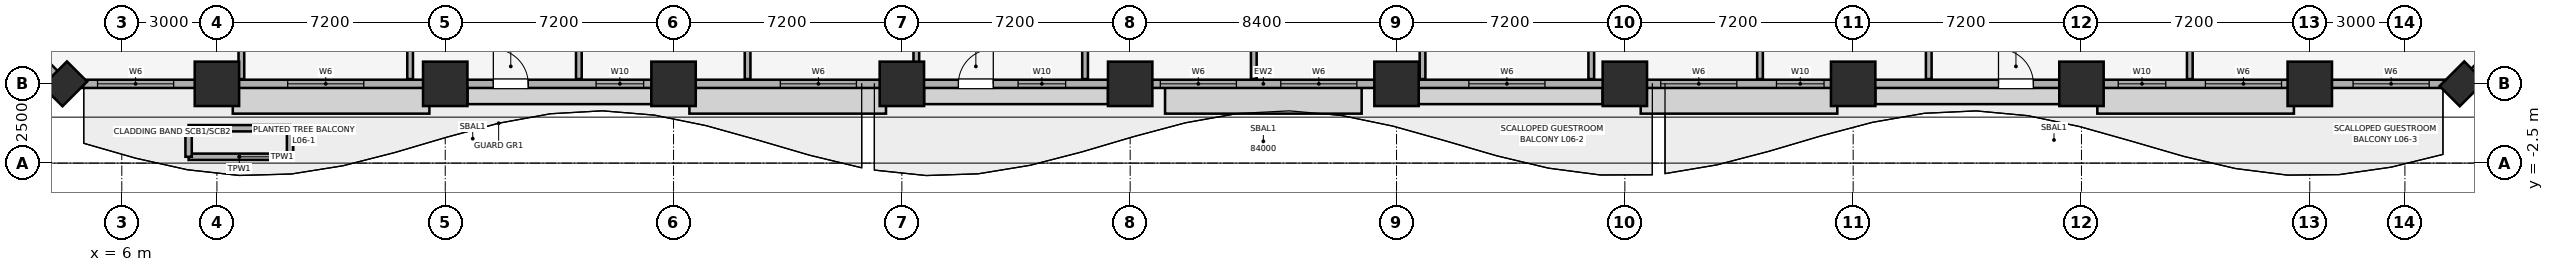
"""IFC4 building model, lengths in metres.
Left out: names, types, materials, properties, quantities, classifications, styles, units other than length and angle.
Written with IfcOpenShell. Run it as: python <this file> out.ifc"""

import sys

from ifc_helpers import new_model, si_unit, direction, frame, frame_2d, origin, origin_2d, place, context, subcontext, project, spatial, rectangle, extrude, element, fill, save


model = new_model("IFC4")
c1 = context("Model", 3, precision=1e-05, world=origin(), true_north=direction((0.0, 1.0)))
c2 = subcontext(c1, "Body", "Model", "MODEL_VIEW")
j1 = project(units=[si_unit("LENGTHUNIT", "METRE"), si_unit("PLANEANGLEUNIT", "RADIAN")], contexts=[c1])
p1 = place(None, origin())
s1 = spatial("IfcSite", under=j1, at=p1, CompositionType="ELEMENT")
p2 = place(p1, origin())
s2 = spatial("IfcBuilding", under=s1, at=p2, CompositionType="ELEMENT")
p3 = place(p2, frame((0.0, 0.0, 35.15)))
s3 = spatial("IfcBuildingStorey", under=s2, at=p3, CompositionType="ELEMENT", Elevation=35.15)
for number, where, z_axis, x_axis in (
    (1, (9.0, 0.0, 0.0), (0.0, 0.0, 1.0), (1.0, 0.0, 0.0)),
    (2, (16.2, 0.0, 0.0), (0.0, 0.0, 1.0), (1.0, 0.0, 0.0)),
    (3, (23.4, 0.0, 0.0), (0.0, 0.0, 1.0), (1.0, 0.0, 0.0)),
    (4, (30.6, 0.0, 0.0), (0.0, 0.0, 1.0), (1.0, 0.0, 0.0)),
    (5, (37.8, 0.0, 0.0), (0.0, 0.0, 1.0), (1.0, 0.0, 0.0)),
    (6, (46.2, 0.0, 0.0), (0.0, 0.0, 1.0), (1.0, 0.0, 0.0)),
    (7, (53.4, 0.0, 0.0), (0.0, 0.0, 1.0), (1.0, 0.0, 0.0)),
    (8, (60.6, 0.0, 0.0), (0.0, 0.0, 1.0), (1.0, 0.0, 0.0)),
    (9, (67.8, 0.0, 0.0), (0.0, 0.0, 1.0), (1.0, 0.0, 0.0)),
    (10, (75.0, 0.0, 0.0), (0.0, 0.0, 1.0), (1.0, 0.0, 0.0)),
):
    element("IfcColumn", number, at=place(p3, frame(where, z_axis=z_axis, x_axis=x_axis)), inside=s3, PredefinedType="COLUMN", context=c2, shape_type="SweptSolid", body=[
        extrude(rectangle(XDim=1.4, YDim=1.4, at=origin_2d()), origin(), (0.0, 0.0, 1.0), 3.51),
    ])
for number, where, z_axis, x_axis in (
    (11, (4.2, 0.0, 0.0), (0.0, 0.0, 1.0), (0.707, 0.707, 0.0)),
    (12, (79.8, 0.0, 0.0), (0.0, 0.0, 1.0), (0.707, 0.707, 0.0)),
):
    element("IfcColumn", number, at=place(p3, frame(where, z_axis=z_axis, x_axis=x_axis)), inside=s3, PredefinedType="PILASTER", context=c2, shape_type="SweptSolid", body=[
        extrude(rectangle(XDim=1.1, YDim=0.9, at=origin_2d()), origin(), (0.0, 0.0, 1.0), 3.51),
    ])
p4 = place(p3, frame((4.2, 0.0, 0.0), z_axis=(0.0, 0.0, 1.0), x_axis=(1.0, 0.0, 0.0)))
e13 = element("IfcWall", 13, at=p4, inside=s3, PredefinedType="SOLIDWALL", context=c2, shape_type="SweptSolid", body=[
    extrude(rectangle(XDim=75.6, YDim=0.26, at=frame_2d((37.8, 0.0))), origin(), (0.0, 0.0, 1.0), 2.56),
])
p5 = place(p4, frame((13.517, 0.0, 0.0)))
e14 = element("IfcOpeningElement", 14, at=p5, cuts=e13, PredefinedType="OPENING", context=c2, shape_type="SweptSolid", body=[
    extrude(rectangle(XDim=1.1, YDim=2.15, at=frame_2d((0.55, 1.075))), frame((0.0, 0.14, 0.0), z_axis=(0.0, -1.0, 0.0), x_axis=(1.0, 0.0, 0.0)), (0.0, 0.0, 1.0), 0.28),
])
p6 = place(p4, frame((28.183, 0.0, 0.0)))
e15 = element("IfcOpeningElement", 15, at=p6, cuts=e13, PredefinedType="OPENING", context=c2, shape_type="SweptSolid", body=[
    extrude(rectangle(XDim=1.1, YDim=2.15, at=frame_2d((0.55, 1.075))), frame((0.0, 0.14, 0.0), z_axis=(0.0, -1.0, 0.0), x_axis=(1.0, 0.0, 0.0)), (0.0, 0.0, 1.0), 0.28),
])
p7 = place(p4, frame((60.983, 0.0, 0.0)))
e16 = element("IfcOpeningElement", 16, at=p7, cuts=e13, PredefinedType="OPENING", context=c2, shape_type="SweptSolid", body=[
    extrude(rectangle(XDim=1.1, YDim=2.15, at=frame_2d((0.55, 1.075))), frame((0.0, 0.14, 0.0), z_axis=(0.0, -1.0, 0.0), x_axis=(1.0, 0.0, 0.0)), (0.0, 0.0, 1.0), 0.28),
])
p8 = place(p4, frame((1.035, 0.0, 0.85)))
e17 = element("IfcOpeningElement", 17, at=p8, cuts=e13, PredefinedType="OPENING", context=c2, shape_type="SweptSolid", body=[
    extrude(rectangle(XDim=2.4, YDim=1.5, at=frame_2d((1.2, 0.75))), frame((0.0, 0.14, 0.0), z_axis=(0.0, -1.0, 0.0), x_axis=(1.0, 0.0, 0.0)), (0.0, 0.0, 1.0), 0.28),
])
p9 = place(p4, frame((7.031, 0.0, 0.85)))
e18 = element("IfcOpeningElement", 18, at=p9, cuts=e13, PredefinedType="OPENING", context=c2, shape_type="SweptSolid", body=[
    extrude(rectangle(XDim=2.4, YDim=1.5, at=frame_2d((1.2, 0.75))), frame((0.0, 0.14, 0.0), z_axis=(0.0, -1.0, 0.0), x_axis=(1.0, 0.0, 0.0)), (0.0, 0.0, 1.0), 0.28),
])
p10 = place(p4, frame((16.757, 0.0, 0.85)))
e19 = element("IfcOpeningElement", 19, at=p10, cuts=e13, PredefinedType="OPENING", context=c2, shape_type="SweptSolid", body=[
    extrude(rectangle(XDim=1.5, YDim=1.4, at=frame_2d((0.75, 0.7))), frame((0.0, 0.14, 0.0), z_axis=(0.0, -1.0, 0.0), x_axis=(1.0, 0.0, 0.0)), (0.0, 0.0, 1.0), 0.28),
])
p11 = place(p4, frame((22.567, 0.0, 0.85)))
e20 = element("IfcOpeningElement", 20, at=p11, cuts=e13, PredefinedType="OPENING", context=c2, shape_type="SweptSolid", body=[
    extrude(rectangle(XDim=2.4, YDim=1.5, at=frame_2d((1.2, 0.75))), frame((0.0, 0.14, 0.0), z_axis=(0.0, -1.0, 0.0), x_axis=(1.0, 0.0, 0.0)), (0.0, 0.0, 1.0), 0.28),
])
p12 = place(p4, frame((30.065, 0.0, 0.85)))
e21 = element("IfcOpeningElement", 21, at=p12, cuts=e13, PredefinedType="OPENING", context=c2, shape_type="SweptSolid", body=[
    extrude(rectangle(XDim=1.5, YDim=1.4, at=frame_2d((0.75, 0.7))), frame((0.0, 0.14, 0.0), z_axis=(0.0, -1.0, 0.0), x_axis=(1.0, 0.0, 0.0)), (0.0, 0.0, 1.0), 0.28),
])
p13 = place(p4, frame((34.55, 0.0, 0.85)))
e22 = element("IfcOpeningElement", 22, at=p13, cuts=e13, PredefinedType="OPENING", context=c2, shape_type="SweptSolid", body=[
    extrude(rectangle(XDim=2.4, YDim=1.5, at=frame_2d((1.2, 0.75))), frame((0.0, 0.14, 0.0), z_axis=(0.0, -1.0, 0.0), x_axis=(1.0, 0.0, 0.0)), (0.0, 0.0, 1.0), 0.28),
])
p14 = place(p4, frame((38.35, 0.0, 0.85)))
e23 = element("IfcOpeningElement", 23, at=p14, cuts=e13, PredefinedType="OPENING", context=c2, shape_type="SweptSolid", body=[
    extrude(rectangle(XDim=2.4, YDim=1.5, at=frame_2d((1.2, 0.75))), frame((0.0, 0.14, 0.0), z_axis=(0.0, -1.0, 0.0), x_axis=(1.0, 0.0, 0.0)), (0.0, 0.0, 1.0), 0.28),
])
p15 = place(p4, frame((44.281, 0.0, 0.85)))
e24 = element("IfcOpeningElement", 24, at=p15, cuts=e13, PredefinedType="OPENING", context=c2, shape_type="SweptSolid", body=[
    extrude(rectangle(XDim=2.4, YDim=1.5, at=frame_2d((1.2, 0.75))), frame((0.0, 0.14, 0.0), z_axis=(0.0, -1.0, 0.0), x_axis=(1.0, 0.0, 0.0)), (0.0, 0.0, 1.0), 0.28),
])
p16 = place(p4, frame((50.332, 0.0, 0.85)))
e25 = element("IfcOpeningElement", 25, at=p16, cuts=e13, PredefinedType="OPENING", context=c2, shape_type="SweptSolid", body=[
    extrude(rectangle(XDim=2.4, YDim=1.5, at=frame_2d((1.2, 0.75))), frame((0.0, 0.14, 0.0), z_axis=(0.0, -1.0, 0.0), x_axis=(1.0, 0.0, 0.0)), (0.0, 0.0, 1.0), 0.28),
])
p17 = place(p4, frame((53.981, 0.0, 0.85)))
e26 = element("IfcOpeningElement", 26, at=p17, cuts=e13, PredefinedType="OPENING", context=c2, shape_type="SweptSolid", body=[
    extrude(rectangle(XDim=1.5, YDim=1.4, at=frame_2d((0.75, 0.7))), frame((0.0, 0.14, 0.0), z_axis=(0.0, -1.0, 0.0), x_axis=(1.0, 0.0, 0.0)), (0.0, 0.0, 1.0), 0.28),
])
p18 = place(p4, frame((64.759, 0.0, 0.85)))
e27 = element("IfcOpeningElement", 27, at=p18, cuts=e13, PredefinedType="OPENING", context=c2, shape_type="SweptSolid", body=[
    extrude(rectangle(XDim=1.5, YDim=1.4, at=frame_2d((0.75, 0.7))), frame((0.0, 0.14, 0.0), z_axis=(0.0, -1.0, 0.0), x_axis=(1.0, 0.0, 0.0)), (0.0, 0.0, 1.0), 0.28),
])
p19 = place(p4, frame((67.509, 0.0, 0.85)))
e28 = element("IfcOpeningElement", 28, at=p19, cuts=e13, PredefinedType="OPENING", context=c2, shape_type="SweptSolid", body=[
    extrude(rectangle(XDim=2.4, YDim=1.5, at=frame_2d((1.2, 0.75))), frame((0.0, 0.14, 0.0), z_axis=(0.0, -1.0, 0.0), x_axis=(1.0, 0.0, 0.0)), (0.0, 0.0, 1.0), 0.28),
])
p20 = place(p4, frame((72.165, 0.0, 0.85)))
e29 = element("IfcOpeningElement", 29, at=p20, cuts=e13, PredefinedType="OPENING", context=c2, shape_type="SweptSolid", body=[
    extrude(rectangle(XDim=2.4, YDim=1.5, at=frame_2d((1.2, 0.75))), frame((0.0, 0.14, 0.0), z_axis=(0.0, -1.0, 0.0), x_axis=(1.0, 0.0, 0.0)), (0.0, 0.0, 1.0), 0.28),
])
for number, where, z_axis, x_axis in (
    (30, (79.8, 0.0, 0.0), (0.0, 0.0, 1.0), (0.707, 0.707, 0.0)),
    (31, (0.0, 4.2, 0.0), (0.0, 0.0, 1.0), (0.707, -0.707, 0.0)),
):
    element("IfcWall", number, at=place(p3, frame(where, z_axis=z_axis, x_axis=x_axis)), inside=s3, PredefinedType="SOLIDWALL", context=c2, shape_type="SweptSolid", body=[
        extrude(rectangle(XDim=5.94, YDim=0.26, at=frame_2d((2.97, 0.0))), origin(), (0.0, 0.0, 1.0), 2.56),
    ])
p21 = place(p3, frame((8.107, -2.3, 0.0), z_axis=(0.0, 0.0, 1.0), x_axis=(1.0, 0.0, 0.0)))
e32 = element("IfcWall", 32, at=p21, inside=s3, PredefinedType="PARAPET", context=c2, shape_type="SweptSolid", body=[
    extrude(rectangle(XDim=3.2, YDim=0.2, at=frame_2d((1.6, 0.0))), origin(), (0.0, 0.0, 1.0), 0.55),
])
p22 = place(p3, frame((11.307, -2.3, 0.0), z_axis=(0.0, 0.0, 1.0), x_axis=(0.0, 1.0, 0.0)))
e33 = element("IfcWall", 33, at=p22, inside=s3, PredefinedType="PARAPET", context=c2, shape_type="SweptSolid", body=[
    extrude(rectangle(XDim=0.9, YDim=0.2, at=frame_2d((0.45, 0.0))), origin(), (0.0, 0.0, 1.0), 0.55),
])
p23 = place(p3, frame((11.307, -1.4, 0.0), z_axis=(0.0, 0.0, 1.0), x_axis=(-1.0, 0.0, 0.0)))
e34 = element("IfcWall", 34, at=p23, inside=s3, PredefinedType="PARAPET", context=c2, shape_type="SweptSolid", body=[
    extrude(rectangle(XDim=3.2, YDim=0.2, at=frame_2d((1.6, 0.0))), origin(), (0.0, 0.0, 1.0), 0.55),
])
p24 = place(p3, frame((8.107, -1.4, 0.0), z_axis=(0.0, 0.0, 1.0), x_axis=(0.0, -1.0, 0.0)))
e35 = element("IfcWall", 35, at=p24, inside=s3, PredefinedType="PARAPET", context=c2, shape_type="SweptSolid", body=[
    extrude(rectangle(XDim=0.9, YDim=0.2, at=frame_2d((0.45, 0.0))), origin(), (0.0, 0.0, 1.0), 0.55),
])
for number, where, z_axis, x_axis in (
    (36, (9.771, 0.15, 0.0), (0.0, 0.0, 1.0), (0.0, 1.0, 0.0)),
    (37, (15.093, 0.15, 0.0), (0.0, 0.0, 1.0), (0.0, 1.0, 0.0)),
    (38, (20.414, 0.15, 0.0), (0.0, 0.0, 1.0), (0.0, 1.0, 0.0)),
    (39, (25.735, 0.15, 0.0), (0.0, 0.0, 1.0), (0.0, 1.0, 0.0)),
    (40, (31.056, 0.15, 0.0), (0.0, 0.0, 1.0), (0.0, 1.0, 0.0)),
    (41, (36.377, 0.15, 0.0), (0.0, 0.0, 1.0), (0.0, 1.0, 0.0)),
    (42, (41.699, 0.15, 0.0), (0.0, 0.0, 1.0), (0.0, 1.0, 0.0)),
    (43, (47.02, 0.15, 0.0), (0.0, 0.0, 1.0), (0.0, 1.0, 0.0)),
    (44, (52.341, 0.15, 0.0), (0.0, 0.0, 1.0), (0.0, 1.0, 0.0)),
    (45, (57.663, 0.15, 0.0), (0.0, 0.0, 1.0), (0.0, 1.0, 0.0)),
    (46, (62.984, 0.15, 0.0), (0.0, 0.0, 1.0), (0.0, 1.0, 0.0)),
):
    element("IfcWall", number, at=place(p3, frame(where, z_axis=z_axis, x_axis=x_axis)), inside=s3, PredefinedType="PARTITIONING", context=c2, shape_type="SweptSolid", body=[
        extrude(rectangle(XDim=8.555, YDim=0.18, at=frame_2d((4.278, 0.0))), origin(), (0.0, 0.0, 1.0), 3.51),
    ])
p25 = place(p3, frame((71.217, 0.15, 0.0), z_axis=(0.0, 0.0, 1.0), x_axis=(0.0, 1.0, 0.0)))
e47 = element("IfcWall", 47, at=p25, inside=s3, PredefinedType="PARTITIONING", context=c2, shape_type="SweptSolid", body=[
    extrude(rectangle(XDim=8.555, YDim=0.18, at=frame_2d((4.278, 0.0))), origin(), (0.0, 0.0, 1.0), 2.88),
])
p26 = place(p5, origin())
e48 = element("IfcDoor", 48, at=p26, inside=s3, OperationType="SINGLE_SWING_LEFT", PredefinedType="DOOR", context=c2, shape_type="SweptSolid", body=[
    extrude(rectangle(XDim=1.1, YDim=2.15, at=frame_2d((0.55, 1.075))), frame((0.0, 0.025, 0.0), z_axis=(0.0, -1.0, 0.0), x_axis=(1.0, 0.0, 0.0)), (0.0, 0.0, 1.0), 0.05),
])
fill(e14, e48)
p27 = place(p6, origin())
e49 = element("IfcDoor", 49, at=p27, inside=s3, OperationType="SINGLE_SWING_RIGHT", PredefinedType="DOOR", context=c2, shape_type="SweptSolid", body=[
    extrude(rectangle(XDim=1.1, YDim=2.15, at=frame_2d((0.55, 1.075))), frame((0.0, 0.025, 0.0), z_axis=(0.0, -1.0, 0.0), x_axis=(1.0, 0.0, 0.0)), (0.0, 0.0, 1.0), 0.05),
])
fill(e15, e49)
p28 = place(p7, origin())
e50 = element("IfcDoor", 50, at=p28, inside=s3, OperationType="SINGLE_SWING_LEFT", PredefinedType="DOOR", context=c2, shape_type="SweptSolid", body=[
    extrude(rectangle(XDim=1.1, YDim=2.15, at=frame_2d((0.55, 1.075))), frame((0.0, 0.025, 0.0), z_axis=(0.0, -1.0, 0.0), x_axis=(1.0, 0.0, 0.0)), (0.0, 0.0, 1.0), 0.05),
])
fill(e16, e50)
p29 = place(p8, origin())
e51 = element("IfcWindow", 51, at=p29, inside=s3, PartitioningType="SINGLE_PANEL", PredefinedType="WINDOW", context=c2, shape_type="SweptSolid", body=[
    extrude(rectangle(XDim=2.4, YDim=1.5, at=frame_2d((1.2, 0.75))), frame((0.0, 0.03, 0.0), z_axis=(0.0, -1.0, 0.0), x_axis=(1.0, 0.0, 0.0)), (0.0, 0.0, 1.0), 0.06),
])
fill(e17, e51)
p30 = place(p9, origin())
e52 = element("IfcWindow", 52, at=p30, inside=s3, PartitioningType="SINGLE_PANEL", PredefinedType="WINDOW", context=c2, shape_type="SweptSolid", body=[
    extrude(rectangle(XDim=2.4, YDim=1.5, at=frame_2d((1.2, 0.75))), frame((0.0, 0.03, 0.0), z_axis=(0.0, -1.0, 0.0), x_axis=(1.0, 0.0, 0.0)), (0.0, 0.0, 1.0), 0.06),
])
fill(e18, e52)
p31 = place(p10, origin())
e53 = element("IfcWindow", 53, at=p31, inside=s3, PartitioningType="SINGLE_PANEL", PredefinedType="WINDOW", context=c2, shape_type="SweptSolid", body=[
    extrude(rectangle(XDim=1.5, YDim=1.4, at=frame_2d((0.75, 0.7))), frame((0.0, 0.03, 0.0), z_axis=(0.0, -1.0, 0.0), x_axis=(1.0, 0.0, 0.0)), (0.0, 0.0, 1.0), 0.06),
])
fill(e19, e53)
p32 = place(p11, origin())
e54 = element("IfcWindow", 54, at=p32, inside=s3, PartitioningType="SINGLE_PANEL", PredefinedType="WINDOW", context=c2, shape_type="SweptSolid", body=[
    extrude(rectangle(XDim=2.4, YDim=1.5, at=frame_2d((1.2, 0.75))), frame((0.0, 0.03, 0.0), z_axis=(0.0, -1.0, 0.0), x_axis=(1.0, 0.0, 0.0)), (0.0, 0.0, 1.0), 0.06),
])
fill(e20, e54)
p33 = place(p12, origin())
e55 = element("IfcWindow", 55, at=p33, inside=s3, PartitioningType="SINGLE_PANEL", PredefinedType="WINDOW", context=c2, shape_type="SweptSolid", body=[
    extrude(rectangle(XDim=1.5, YDim=1.4, at=frame_2d((0.75, 0.7))), frame((0.0, 0.03, 0.0), z_axis=(0.0, -1.0, 0.0), x_axis=(1.0, 0.0, 0.0)), (0.0, 0.0, 1.0), 0.06),
])
fill(e21, e55)
p34 = place(p13, origin())
e56 = element("IfcWindow", 56, at=p34, inside=s3, PartitioningType="SINGLE_PANEL", PredefinedType="WINDOW", context=c2, shape_type="SweptSolid", body=[
    extrude(rectangle(XDim=2.4, YDim=1.5, at=frame_2d((1.2, 0.75))), frame((0.0, 0.03, 0.0), z_axis=(0.0, -1.0, 0.0), x_axis=(1.0, 0.0, 0.0)), (0.0, 0.0, 1.0), 0.06),
])
fill(e22, e56)
p35 = place(p14, origin())
e57 = element("IfcWindow", 57, at=p35, inside=s3, PartitioningType="SINGLE_PANEL", PredefinedType="WINDOW", context=c2, shape_type="SweptSolid", body=[
    extrude(rectangle(XDim=2.4, YDim=1.5, at=frame_2d((1.2, 0.75))), frame((0.0, 0.03, 0.0), z_axis=(0.0, -1.0, 0.0), x_axis=(1.0, 0.0, 0.0)), (0.0, 0.0, 1.0), 0.06),
])
fill(e23, e57)
p36 = place(p15, origin())
e58 = element("IfcWindow", 58, at=p36, inside=s3, PartitioningType="SINGLE_PANEL", PredefinedType="WINDOW", context=c2, shape_type="SweptSolid", body=[
    extrude(rectangle(XDim=2.4, YDim=1.5, at=frame_2d((1.2, 0.75))), frame((0.0, 0.03, 0.0), z_axis=(0.0, -1.0, 0.0), x_axis=(1.0, 0.0, 0.0)), (0.0, 0.0, 1.0), 0.06),
])
fill(e24, e58)
p37 = place(p16, origin())
e59 = element("IfcWindow", 59, at=p37, inside=s3, PartitioningType="SINGLE_PANEL", PredefinedType="WINDOW", context=c2, shape_type="SweptSolid", body=[
    extrude(rectangle(XDim=2.4, YDim=1.5, at=frame_2d((1.2, 0.75))), frame((0.0, 0.03, 0.0), z_axis=(0.0, -1.0, 0.0), x_axis=(1.0, 0.0, 0.0)), (0.0, 0.0, 1.0), 0.06),
])
fill(e25, e59)
p38 = place(p17, origin())
e60 = element("IfcWindow", 60, at=p38, inside=s3, PartitioningType="SINGLE_PANEL", PredefinedType="WINDOW", context=c2, shape_type="SweptSolid", body=[
    extrude(rectangle(XDim=1.5, YDim=1.4, at=frame_2d((0.75, 0.7))), frame((0.0, 0.03, 0.0), z_axis=(0.0, -1.0, 0.0), x_axis=(1.0, 0.0, 0.0)), (0.0, 0.0, 1.0), 0.06),
])
fill(e26, e60)
p39 = place(p18, origin())
e61 = element("IfcWindow", 61, at=p39, inside=s3, PartitioningType="SINGLE_PANEL", PredefinedType="WINDOW", context=c2, shape_type="SweptSolid", body=[
    extrude(rectangle(XDim=1.5, YDim=1.4, at=frame_2d((0.75, 0.7))), frame((0.0, 0.03, 0.0), z_axis=(0.0, -1.0, 0.0), x_axis=(1.0, 0.0, 0.0)), (0.0, 0.0, 1.0), 0.06),
])
fill(e27, e61)
p40 = place(p19, origin())
e62 = element("IfcWindow", 62, at=p40, inside=s3, PartitioningType="SINGLE_PANEL", PredefinedType="WINDOW", context=c2, shape_type="SweptSolid", body=[
    extrude(rectangle(XDim=2.4, YDim=1.5, at=frame_2d((1.2, 0.75))), frame((0.0, 0.03, 0.0), z_axis=(0.0, -1.0, 0.0), x_axis=(1.0, 0.0, 0.0)), (0.0, 0.0, 1.0), 0.06),
])
fill(e28, e62)
p41 = place(p20, origin())
e63 = element("IfcWindow", 63, at=p41, inside=s3, PartitioningType="SINGLE_PANEL", PredefinedType="WINDOW", context=c2, shape_type="SweptSolid", body=[
    extrude(rectangle(XDim=2.4, YDim=1.5, at=frame_2d((1.2, 0.75))), frame((0.0, 0.03, 0.0), z_axis=(0.0, -1.0, 0.0), x_axis=(1.0, 0.0, 0.0)), (0.0, 0.0, 1.0), 0.06),
])
fill(e29, e63)
save(model, sys.argv[1])
